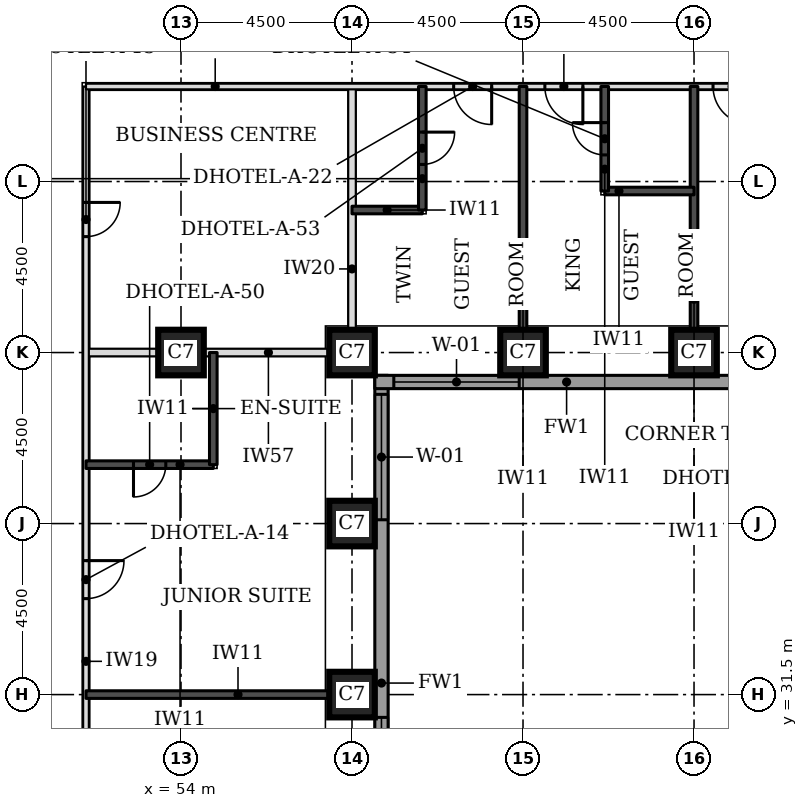
"""IFC4 building model, lengths in metres.
Left out: names, types, materials, properties, quantities, classifications, styles, units other than length and angle.
Written with IfcOpenShell. Run it as: python <this file> out.ifc"""

import sys

from ifc_helpers import new_model, si_unit, direction, frame, frame_2d, origin, origin_2d, place, context, subcontext, project, spatial, rectangle, extrude, element, fill, save


model = new_model("IFC4")
c1 = context("Model", 3, precision=1e-05, world=origin(), true_north=direction((0.0, 1.0)))
c2 = subcontext(c1, "Body", "Model", "MODEL_VIEW")
j1 = project(units=[si_unit("LENGTHUNIT", "METRE"), si_unit("PLANEANGLEUNIT", "RADIAN")], contexts=[c1])
p1 = place(None, origin())
s1 = spatial("IfcSite", under=j1, at=p1, CompositionType="ELEMENT")
p2 = place(p1, origin())
s2 = spatial("IfcBuilding", under=s1, at=p2, CompositionType="ELEMENT")
p3 = place(p2, frame((0.0, 0.0, 49.5)))
s3 = spatial("IfcBuildingStorey", under=s2, at=p3, CompositionType="ELEMENT", Elevation=49.5)
for number, where, z_axis, x_axis in (
    (1, (58.5, 31.5, 0.0), (0.0, 0.0, 1.0), (1.0, 0.0, 0.0)),
    (2, (58.5, 36.0, 0.0), (0.0, 0.0, 1.0), (1.0, 0.0, 0.0)),
    (3, (54.0, 40.5, 0.0), (0.0, 0.0, 1.0), (1.0, 0.0, 0.0)),
    (4, (58.5, 40.5, 0.0), (0.0, 0.0, 1.0), (1.0, 0.0, 0.0)),
    (5, (63.0, 40.5, 0.0), (0.0, 0.0, 1.0), (1.0, 0.0, 0.0)),
    (6, (67.5, 40.5, 0.0), (0.0, 0.0, 1.0), (1.0, 0.0, 0.0)),
):
    element("IfcColumn", number, at=place(p3, frame(where, z_axis=z_axis, x_axis=x_axis)), inside=s3, PredefinedType="COLUMN", context=c2, shape_type="SweptSolid", body=[
        extrude(rectangle(XDim=1.2, YDim=1.2, at=origin_2d()), origin(), (0.0, 0.0, 1.0), 3.3),
    ])
p4 = place(p3, frame((59.275, 22.106, 0.0), z_axis=(0.0, 0.0, 1.0), x_axis=(0.0, 1.0, 0.0)))
e7 = element("IfcWall", 7, at=p4, inside=s3, PredefinedType="STANDARD", context=c2, shape_type="SweptSolid", body=[
    extrude(rectangle(XDim=17.793, YDim=0.35, at=frame_2d((8.897, 0.0))), origin(), (0.0, 0.0, 1.0), 3.055),
])
p5 = place(p4, frame((5.493, 0.0, 0.8)))
e8 = element("IfcOpeningElement", 8, at=p5, cuts=e7, PredefinedType="OPENING", context=c2, shape_type="SweptSolid", body=[
    extrude(rectangle(XDim=3.3, YDim=1.5, at=frame_2d((1.65, 0.75))), frame((0.0, 0.185, 0.0), z_axis=(0.0, -1.0, 0.0), x_axis=(1.0, 0.0, 0.0)), (0.0, 0.0, 1.0), 0.37),
])
p6 = place(p4, frame((13.993, 0.0, 0.8)))
e9 = element("IfcOpeningElement", 9, at=p6, cuts=e7, PredefinedType="OPENING", context=c2, shape_type="SweptSolid", body=[
    extrude(rectangle(XDim=3.3, YDim=1.5, at=frame_2d((1.65, 0.75))), frame((0.0, 0.185, 0.0), z_axis=(0.0, -1.0, 0.0), x_axis=(1.0, 0.0, 0.0)), (0.0, 0.0, 1.0), 0.37),
])
p7 = place(p3, frame((59.1, 39.725, 0.0), z_axis=(0.0, 0.0, 1.0), x_axis=(1.0, 0.0, 0.0)))
e10 = element("IfcWall", 10, at=p7, inside=s3, PredefinedType="STANDARD", context=c2, shape_type="SweptSolid", body=[
    extrude(rectangle(XDim=13.293, YDim=0.35, at=frame_2d((6.647, 0.0))), origin(), (0.0, 0.0, 1.0), 3.055),
])
p8 = place(p7, frame((0.5, 0.0, 0.8)))
e11 = element("IfcOpeningElement", 11, at=p8, cuts=e10, PredefinedType="OPENING", context=c2, shape_type="SweptSolid", body=[
    extrude(rectangle(XDim=3.3, YDim=1.5, at=frame_2d((1.65, 0.75))), frame((0.0, 0.185, 0.0), z_axis=(0.0, -1.0, 0.0), x_axis=(1.0, 0.0, 0.0)), (0.0, 0.0, 1.0), 0.37),
])
p9 = place(p3, frame((51.5, 40.5, 0.0), z_axis=(0.0, 0.0, 1.0), x_axis=(1.0, 0.0, 0.0)))
e12 = element("IfcWall", 12, at=p9, inside=s3, PredefinedType="PARTITIONING", context=c2, shape_type="SweptSolid", body=[
    extrude(rectangle(XDim=6.4, YDim=0.2, at=frame_2d((3.2, 0.0))), origin(), (0.0, 0.0, 1.0), 2.33),
])
p10 = place(p3, frame((58.5, 41.1, 0.0), z_axis=(0.0, 0.0, 1.0), x_axis=(0.0, 1.0, 0.0)))
e13 = element("IfcWall", 13, at=p10, inside=s3, PredefinedType="PARTITIONING", context=c2, shape_type="SweptSolid", body=[
    extrude(rectangle(XDim=6.4, YDim=0.2, at=frame_2d((3.2, 0.0))), origin(), (0.0, 0.0, 1.0), 3.08),
])
p11 = place(p3, frame((51.5, 23.65, 0.0), z_axis=(0.0, 0.0, 1.0), x_axis=(0.0, 1.0, 0.0)))
e14 = element("IfcWall", 14, at=p11, inside=s3, PredefinedType="PARTITIONING", context=c2, shape_type="SweptSolid", body=[
    extrude(rectangle(XDim=23.85, YDim=0.15, at=frame_2d((11.925, 0.0))), origin(), (0.0, 0.0, 1.0), 3.08),
])
p12 = place(p11, frame((4.075, 0.0, 0.0)))
e15 = element("IfcOpeningElement", 15, at=p12, cuts=e14, PredefinedType="OPENING", context=c2, shape_type="SweptSolid", body=[
    extrude(rectangle(XDim=1.0, YDim=2.1, at=frame_2d((0.5, 1.05))), frame((0.0, 0.085, 0.0), z_axis=(0.0, -1.0, 0.0), x_axis=(1.0, 0.0, 0.0)), (0.0, 0.0, 1.0), 0.17),
])
p13 = place(p11, frame((10.375, 0.0, 0.0)))
e16 = element("IfcOpeningElement", 16, at=p13, cuts=e14, PredefinedType="OPENING", context=c2, shape_type="SweptSolid", body=[
    extrude(rectangle(XDim=1.0, YDim=2.1, at=frame_2d((0.5, 1.05))), frame((0.0, 0.085, 0.0), z_axis=(0.0, -1.0, 0.0), x_axis=(1.0, 0.0, 0.0)), (0.0, 0.0, 1.0), 0.17),
])
p14 = place(p11, frame((19.9, 0.0, 0.0)))
e17 = element("IfcOpeningElement", 17, at=p14, cuts=e14, PredefinedType="OPENING", context=c2, shape_type="SweptSolid", body=[
    extrude(rectangle(XDim=0.9, YDim=2.1, at=frame_2d((0.45, 1.05))), frame((0.0, 0.085, 0.0), z_axis=(0.0, -1.0, 0.0), x_axis=(1.0, 0.0, 0.0)), (0.0, 0.0, 1.0), 0.17),
])
p15 = place(p3, frame((51.5, 47.5, 0.0), z_axis=(0.0, 0.0, 1.0), x_axis=(1.0, 0.0, 0.0)))
e18 = element("IfcWall", 18, at=p15, inside=s3, PredefinedType="PARTITIONING", context=c2, shape_type="SweptSolid", body=[
    extrude(rectangle(XDim=18.0, YDim=0.15, at=frame_2d((9.0, 0.0))), origin(), (0.0, 0.0, 1.0), 3.08),
])
p16 = place(p15, frame((12.075, 0.0, 0.0)))
e19 = element("IfcOpeningElement", 19, at=p16, cuts=e18, PredefinedType="OPENING", context=c2, shape_type="SweptSolid", body=[
    extrude(rectangle(XDim=1.0, YDim=2.1, at=frame_2d((0.5, 1.05))), frame((0.0, 0.085, 0.0), z_axis=(0.0, -1.0, 0.0), x_axis=(1.0, 0.0, 0.0)), (0.0, 0.0, 1.0), 0.17),
])
p17 = place(p15, frame((9.675, 0.0, 0.0)))
e20 = element("IfcOpeningElement", 20, at=p17, cuts=e18, PredefinedType="OPENING", context=c2, shape_type="SweptSolid", body=[
    extrude(rectangle(XDim=1.0, YDim=2.1, at=frame_2d((0.5, 1.05))), frame((0.0, 0.085, 0.0), z_axis=(0.0, -1.0, 0.0), x_axis=(1.0, 0.0, 0.0)), (0.0, 0.0, 1.0), 0.17),
])
p18 = place(p15, frame((16.5, 0.0, 0.0)))
e21 = element("IfcOpeningElement", 21, at=p18, cuts=e18, PredefinedType="OPENING", context=c2, shape_type="SweptSolid", body=[
    extrude(rectangle(XDim=1.0, YDim=2.1, at=frame_2d((0.5, 1.05))), frame((0.0, 0.085, 0.0), z_axis=(0.0, -1.0, 0.0), x_axis=(1.0, 0.0, 0.0)), (0.0, 0.0, 1.0), 0.17),
])
p19 = place(p3, frame((51.5, 31.5, 0.0), z_axis=(0.0, 0.0, 1.0), x_axis=(1.0, 0.0, 0.0)))
e22 = element("IfcWall", 22, at=p19, inside=s3, PredefinedType="SOLIDWALL", context=c2, shape_type="SweptSolid", body=[
    extrude(rectangle(XDim=6.4, YDim=0.2, at=frame_2d((3.2, 0.0))), origin(), (0.0, 0.0, 1.0), 3.08),
])
p20 = place(p3, frame((51.5, 37.55, 0.0), z_axis=(0.0, 0.0, 1.0), x_axis=(1.0, 0.0, 0.0)))
e23 = element("IfcWall", 23, at=p20, inside=s3, PredefinedType="SOLIDWALL", context=c2, shape_type="SweptSolid", body=[
    extrude(rectangle(XDim=3.35, YDim=0.2, at=frame_2d((1.675, 0.0))), origin(), (0.0, 0.0, 1.0), 3.08),
])
p21 = place(p20, frame((1.25, 0.0, 0.0)))
e24 = element("IfcOpeningElement", 24, at=p21, cuts=e23, PredefinedType="OPENING", context=c2, shape_type="SweptSolid", body=[
    extrude(rectangle(XDim=0.85, YDim=2.1, at=frame_2d((0.425, 1.05))), frame((0.0, 0.11, 0.0), z_axis=(0.0, -1.0, 0.0), x_axis=(1.0, 0.0, 0.0)), (0.0, 0.0, 1.0), 0.22),
])
p22 = place(p3, frame((54.85, 37.55, 0.0), z_axis=(0.0, 0.0, 1.0), x_axis=(0.0, 1.0, 0.0)))
e25 = element("IfcWall", 25, at=p22, inside=s3, PredefinedType="SOLIDWALL", context=c2, shape_type="SweptSolid", body=[
    extrude(rectangle(XDim=2.95, YDim=0.2, at=frame_2d((1.475, 0.0))), origin(), (0.0, 0.0, 1.0), 3.08),
])
for number, where, z_axis, x_axis in (
    (26, (63.0, 41.1, 0.0), (0.0, 0.0, 1.0), (0.0, 1.0, 0.0)),
    (27, (67.5, 41.1, 0.0), (0.0, 0.0, 1.0), (0.0, 1.0, 0.0)),
):
    element("IfcWall", number, at=place(p3, frame(where, z_axis=z_axis, x_axis=x_axis)), inside=s3, PredefinedType="SOLIDWALL", context=c2, shape_type="SweptSolid", body=[
        extrude(rectangle(XDim=6.4, YDim=0.2, at=frame_2d((3.2, 0.0))), origin(), (0.0, 0.0, 1.0), 3.08),
    ])
p23 = place(p3, frame((58.5, 44.25, 0.0), z_axis=(0.0, 0.0, 1.0), x_axis=(1.0, 0.0, 0.0)))
e28 = element("IfcWall", 28, at=p23, inside=s3, PredefinedType="SOLIDWALL", context=c2, shape_type="SweptSolid", body=[
    extrude(rectangle(XDim=1.85, YDim=0.2, at=frame_2d((0.925, 0.0))), origin(), (0.0, 0.0, 1.0), 3.08),
])
p24 = place(p3, frame((60.35, 44.25, 0.0), z_axis=(0.0, 0.0, 1.0), x_axis=(0.0, 1.0, 0.0)))
e29 = element("IfcWall", 29, at=p24, inside=s3, PredefinedType="SOLIDWALL", context=c2, shape_type="SweptSolid", body=[
    extrude(rectangle(XDim=3.25, YDim=0.2, at=frame_2d((1.625, 0.0))), origin(), (0.0, 0.0, 1.0), 3.08),
])
p25 = place(p24, frame((1.2, 0.0, 0.0)))
e30 = element("IfcOpeningElement", 30, at=p25, cuts=e29, PredefinedType="OPENING", context=c2, shape_type="SweptSolid", body=[
    extrude(rectangle(XDim=0.85, YDim=2.1, at=frame_2d((0.425, 1.05))), frame((0.0, 0.11, 0.0), z_axis=(0.0, -1.0, 0.0), x_axis=(1.0, 0.0, 0.0)), (0.0, 0.0, 1.0), 0.22),
])
p26 = place(p3, frame((65.15, 44.75, 0.0), z_axis=(0.0, 0.0, 1.0), x_axis=(1.0, 0.0, 0.0)))
e31 = element("IfcWall", 31, at=p26, inside=s3, PredefinedType="SOLIDWALL", context=c2, shape_type="SweptSolid", body=[
    extrude(rectangle(XDim=2.35, YDim=0.2, at=frame_2d((1.175, 0.0))), origin(), (0.0, 0.0, 1.0), 3.08),
])
p27 = place(p3, frame((65.15, 44.75, 0.0), z_axis=(0.0, 0.0, 1.0), x_axis=(0.0, 1.0, 0.0)))
e32 = element("IfcWall", 32, at=p27, inside=s3, PredefinedType="SOLIDWALL", context=c2, shape_type="SweptSolid", body=[
    extrude(rectangle(XDim=2.75, YDim=0.2, at=frame_2d((1.375, 0.0))), origin(), (0.0, 0.0, 1.0), 3.08),
])
p28 = place(p27, frame((0.95, 0.0, 0.0)))
e33 = element("IfcOpeningElement", 33, at=p28, cuts=e32, PredefinedType="OPENING", context=c2, shape_type="SweptSolid", body=[
    extrude(rectangle(XDim=0.85, YDim=2.1, at=frame_2d((0.425, 1.05))), frame((0.0, 0.11, 0.0), z_axis=(0.0, -1.0, 0.0), x_axis=(1.0, 0.0, 0.0)), (0.0, 0.0, 1.0), 0.22),
])
p29 = place(p5, origin())
e34 = element("IfcWindow", 34, at=p29, inside=s3, PartitioningType="SINGLE_PANEL", PredefinedType="WINDOW", context=c2, shape_type="SweptSolid", body=[
    extrude(rectangle(XDim=3.3, YDim=1.5, at=frame_2d((1.65, 0.75))), frame((0.0, 0.085, 0.0), z_axis=(0.0, -1.0, 0.0), x_axis=(1.0, 0.0, 0.0)), (0.0, 0.0, 1.0), 0.06),
])
fill(e8, e34)
p30 = place(p6, origin())
e35 = element("IfcWindow", 35, at=p30, inside=s3, PartitioningType="SINGLE_PANEL", PredefinedType="WINDOW", context=c2, shape_type="SweptSolid", body=[
    extrude(rectangle(XDim=3.3, YDim=1.5, at=frame_2d((1.65, 0.75))), frame((0.0, 0.085, 0.0), z_axis=(0.0, -1.0, 0.0), x_axis=(1.0, 0.0, 0.0)), (0.0, 0.0, 1.0), 0.06),
])
fill(e9, e35)
p31 = place(p8, origin())
e36 = element("IfcWindow", 36, at=p31, inside=s3, PartitioningType="SINGLE_PANEL", PredefinedType="WINDOW", context=c2, shape_type="SweptSolid", body=[
    extrude(rectangle(XDim=3.3, YDim=1.5, at=frame_2d((1.65, 0.75))), frame((0.0, 0.085, 0.0), z_axis=(0.0, -1.0, 0.0), x_axis=(1.0, 0.0, 0.0)), (0.0, 0.0, 1.0), 0.06),
])
fill(e11, e36)
p32 = place(p13, frame((1.0, 0.0, 0.0), z_axis=(0.0, 0.0, 1.0), x_axis=(-1.0, 0.0, 0.0)))
e37 = element("IfcDoor", 37, at=p32, inside=s3, OperationType="SINGLE_SWING_LEFT", PredefinedType="DOOR", context=c2, shape_type="SweptSolid", body=[
    extrude(rectangle(XDim=1.0, YDim=2.1, at=frame_2d((0.5, 1.05))), frame((0.0, 0.025, 0.0), z_axis=(0.0, -1.0, 0.0), x_axis=(1.0, 0.0, 0.0)), (0.0, 0.0, 1.0), 0.05),
])
fill(e16, e37)
p33 = place(p21, frame((0.85, 0.0, 0.0), z_axis=(0.0, 0.0, 1.0), x_axis=(-1.0, 0.0, 0.0)))
e38 = element("IfcDoor", 38, at=p33, inside=s3, OperationType="SINGLE_SWING_RIGHT", PredefinedType="DOOR", context=c2, shape_type="SweptSolid", body=[
    extrude(rectangle(XDim=0.85, YDim=2.1, at=frame_2d((0.425, 1.05))), frame((0.0, 0.025, 0.0), z_axis=(0.0, -1.0, 0.0), x_axis=(1.0, 0.0, 0.0)), (0.0, 0.0, 1.0), 0.05),
])
fill(e24, e38)
p34 = place(p16, frame((1.0, 0.0, 0.0), z_axis=(0.0, 0.0, 1.0), x_axis=(-1.0, 0.0, 0.0)))
e39 = element("IfcDoor", 39, at=p34, inside=s3, OperationType="SINGLE_SWING_LEFT", PredefinedType="DOOR", context=c2, shape_type="SweptSolid", body=[
    extrude(rectangle(XDim=1.0, YDim=2.1, at=frame_2d((0.5, 1.05))), frame((0.0, 0.025, 0.0), z_axis=(0.0, -1.0, 0.0), x_axis=(1.0, 0.0, 0.0)), (0.0, 0.0, 1.0), 0.05),
])
fill(e19, e39)
p35 = place(p28, origin())
e40 = element("IfcDoor", 40, at=p35, inside=s3, OperationType="SINGLE_SWING_RIGHT", PredefinedType="DOOR", context=c2, shape_type="SweptSolid", body=[
    extrude(rectangle(XDim=0.85, YDim=2.1, at=frame_2d((0.425, 1.05))), frame((0.0, 0.025, 0.0), z_axis=(0.0, -1.0, 0.0), x_axis=(1.0, 0.0, 0.0)), (0.0, 0.0, 1.0), 0.05),
])
fill(e33, e40)
p36 = place(p17, frame((1.0, 0.0, 0.0), z_axis=(0.0, 0.0, 1.0), x_axis=(-1.0, 0.0, 0.0)))
e41 = element("IfcDoor", 41, at=p36, inside=s3, OperationType="SINGLE_SWING_LEFT", PredefinedType="DOOR", context=c2, shape_type="SweptSolid", body=[
    extrude(rectangle(XDim=1.0, YDim=2.1, at=frame_2d((0.5, 1.05))), frame((0.0, 0.025, 0.0), z_axis=(0.0, -1.0, 0.0), x_axis=(1.0, 0.0, 0.0)), (0.0, 0.0, 1.0), 0.05),
])
fill(e20, e41)
p37 = place(p25, frame((0.85, 0.0, 0.0), z_axis=(0.0, 0.0, 1.0), x_axis=(-1.0, 0.0, 0.0)))
e42 = element("IfcDoor", 42, at=p37, inside=s3, OperationType="SINGLE_SWING_LEFT", PredefinedType="DOOR", context=c2, shape_type="SweptSolid", body=[
    extrude(rectangle(XDim=0.85, YDim=2.1, at=frame_2d((0.425, 1.05))), frame((0.0, 0.025, 0.0), z_axis=(0.0, -1.0, 0.0), x_axis=(1.0, 0.0, 0.0)), (0.0, 0.0, 1.0), 0.05),
])
fill(e30, e42)
p38 = place(p18, frame((1.0, 0.0, 0.0), z_axis=(0.0, 0.0, 1.0), x_axis=(-1.0, 0.0, 0.0)))
e43 = element("IfcDoor", 43, at=p38, inside=s3, OperationType="SINGLE_SWING_LEFT", PredefinedType="DOOR", context=c2, shape_type="SweptSolid", body=[
    extrude(rectangle(XDim=1.0, YDim=2.1, at=frame_2d((0.5, 1.05))), frame((0.0, 0.025, 0.0), z_axis=(0.0, -1.0, 0.0), x_axis=(1.0, 0.0, 0.0)), (0.0, 0.0, 1.0), 0.05),
])
fill(e21, e43)
p39 = place(p14, frame((0.9, 0.0, 0.0), z_axis=(0.0, 0.0, 1.0), x_axis=(-1.0, 0.0, 0.0)))
e44 = element("IfcDoor", 44, at=p39, inside=s3, OperationType="SINGLE_SWING_LEFT", PredefinedType="DOOR", context=c2, shape_type="SweptSolid", body=[
    extrude(rectangle(XDim=0.9, YDim=2.1, at=frame_2d((0.45, 1.05))), frame((0.0, 0.025, 0.0), z_axis=(0.0, -1.0, 0.0), x_axis=(1.0, 0.0, 0.0)), (0.0, 0.0, 1.0), 0.05),
])
fill(e17, e44)
save(model, sys.argv[1])
